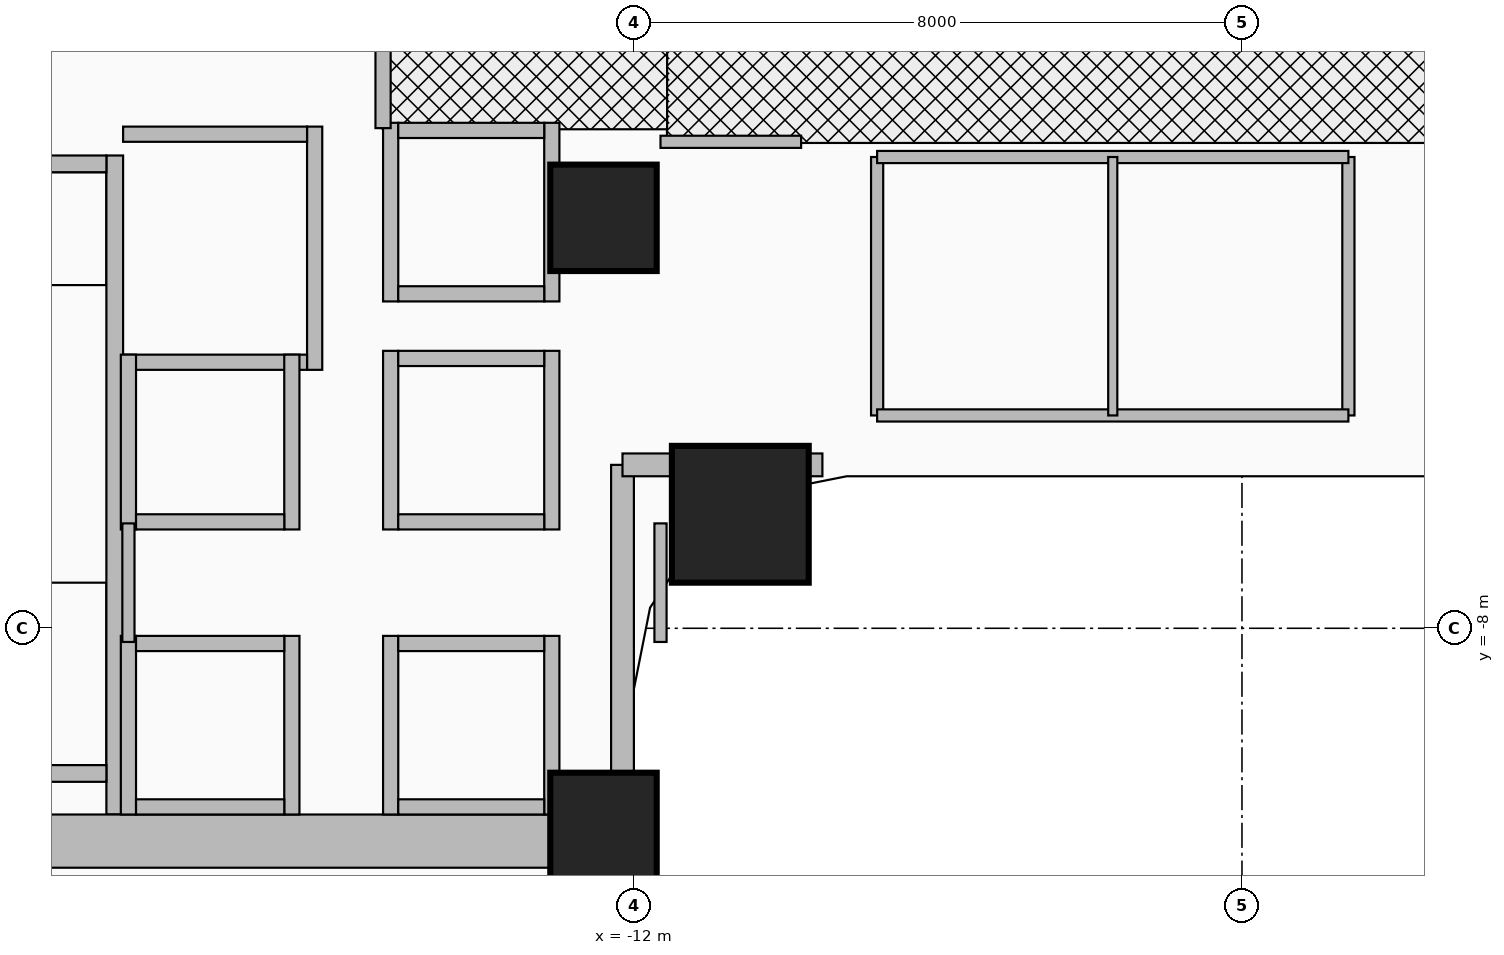
"""IFC4 building model, lengths in metres.
Left out: names, types, materials, properties, quantities, classifications, styles, units other than length and angle.
Written with IfcOpenShell. Run it as: python <this file> out.ifc"""

import sys

from ifc_helpers import new_model, si_unit, direction, frame, frame_2d, origin, origin_2d, place, context, subcontext, project, spatial, rectangle, extrude, source, transform, mapped, element, fill, save


model = new_model("IFC4")
c1 = context("Model", 3, precision=1e-05, world=origin(), true_north=direction((0.0, 1.0)))
c2 = subcontext(c1, "Body", "Model", "MODEL_VIEW")
j1 = project(units=[si_unit("LENGTHUNIT", "METRE"), si_unit("PLANEANGLEUNIT", "RADIAN")], contexts=[c1])
p1 = place(None, origin())
s1 = spatial("IfcSite", under=j1, at=p1, CompositionType="ELEMENT")
p2 = place(p1, origin())
s2 = spatial("IfcBuilding", under=s1, at=p2, CompositionType="ELEMENT")
p3 = place(p2, frame((0.0, 0.0, 5.2)))
s3 = spatial("IfcBuildingStorey", under=s2, at=p3, CompositionType="ELEMENT", Elevation=5.2)
p4 = place(p3, frame((-18.83, -10.45, 0.0), z_axis=(0.0, 0.0, 1.0), x_axis=(0.0, 1.0, 0.0)))
e1 = element("IfcWall", 1, at=p4, inside=s3, PredefinedType="SHEAR", context=c2, shape_type="SweptSolid", body=[
    extrude(rectangle(XDim=8.67, YDim=0.22, at=frame_2d((4.335, 0.0))), origin(), (0.0, 0.0, 1.0), 4.92),
])
p5 = place(p3, frame((-22.05, -9.91, 0.0), z_axis=(0.0, 0.0, 1.0), x_axis=(1.0, 0.0, 0.0)))
e2 = element("IfcWall", 2, at=p5, inside=s3, PredefinedType="SHEAR", context=c2, shape_type="SweptSolid", body=[
    extrude(rectangle(XDim=3.11, YDim=0.22, at=frame_2d((1.555, 0.0))), origin(), (0.0, 0.0, 1.0), 4.92),
])
p6 = place(p3, frame((-22.05, -1.89, 0.0), z_axis=(0.0, 0.0, 1.0), x_axis=(1.0, 0.0, 0.0)))
e3 = element("IfcWall", 3, at=p6, inside=s3, PredefinedType="SHEAR", context=c2, shape_type="SweptSolid", body=[
    extrude(rectangle(XDim=3.11, YDim=0.22, at=frame_2d((1.555, 0.0))), origin(), (0.0, 0.0, 1.0), 4.92),
])
p7 = place(p6, frame((1.0, 0.0, 0.0)))
e4 = element("IfcOpeningElement", 4, at=p7, cuts=e3, PredefinedType="OPENING", context=c2, shape_type="SweptSolid", body=[
    extrude(rectangle(XDim=1.1, YDim=2.15, at=frame_2d((0.55, 1.075))), frame((0.0, 0.125, 0.0), z_axis=(0.0, -1.0, 0.0), x_axis=(1.0, 0.0, 0.0)), (0.0, 0.0, 1.0), 0.25),
])
p8 = place(p3, frame((-22.65, -10.8, 0.0), z_axis=(0.0, 0.0, 1.0), x_axis=(1.0, 0.0, 0.0)))
e5 = element("IfcWall", 5, at=p8, inside=s3, PredefinedType="SHEAR", context=c2, shape_type="SweptSolid", body=[
    extrude(rectangle(XDim=10.25, YDim=0.7, at=frame_2d((5.125, 0.0))), origin(), (0.0, 0.0, 1.0), 4.92),
])
m1 = source(origin(), c2, "Body", "SweptSolid", [
    extrude(rectangle(XDim=1.4, YDim=1.4, at=origin_2d()), origin(), (0.0, 0.0, 1.0), 5.2),
])
for number, where, z_axis, x_axis in (
    (6, (-12.4, -10.6, 0.0), (0.0, 0.0, 1.0), (1.0, 0.0, 0.0)),
    (7, (-12.4, -2.6, 0.0), (0.0, 0.0, 1.0), (1.0, 0.0, 0.0)),
):
    element("IfcColumn", number, at=place(p3, frame(where, z_axis=z_axis, x_axis=x_axis)), inside=s3, PredefinedType="COLUMN", context=c2, shape_type="MappedRepresentation", body=[
        mapped(m1, transform((0.0, 0.0, 0.0), x_axis=(1.0, 0.0, 0.0), y_axis=(0.0, 1.0, 0.0), z_axis=(0.0, 0.0, 1.0), scale=1.0)),
    ])
m2 = source(origin(), c2, "Body", "SweptSolid", [
    extrude(rectangle(XDim=1.8, YDim=1.8, at=origin_2d()), origin(), (0.0, 0.0, 1.0), 5.2),
])
p9 = place(p3, frame((-10.6, -6.5, 0.0), z_axis=(0.0, 0.0, 1.0), x_axis=(1.0, 0.0, 0.0)))
e8 = element("IfcColumn", 8, at=p9, inside=s3, PredefinedType="COLUMN", context=c2, shape_type="MappedRepresentation", body=[
    mapped(m2, transform((0.0, 0.0, 0.0), x_axis=(1.0, 0.0, 0.0), y_axis=(0.0, 1.0, 0.0), z_axis=(0.0, 0.0, 1.0), scale=1.0)),
])
p10 = place(p3, frame((-12.15, -22.85, 0.0), z_axis=(0.0, 0.0, 1.0), x_axis=(0.0, 1.0, 0.0)))
e9 = element("IfcWall", 9, at=p10, inside=s3, PredefinedType="SOLIDWALL", context=c2, shape_type="SweptSolid", body=[
    extrude(rectangle(XDim=17.0, YDim=0.3, at=frame_2d((8.5, 0.0))), origin(), (0.0, 0.0, 1.0), 3.957),
])
p11 = place(p3, frame((-12.15, -5.85, 0.0), z_axis=(0.0, 0.0, 1.0), x_axis=(1.0, 0.0, 0.0)))
e10 = element("IfcWall", 10, at=p11, inside=s3, PredefinedType="SOLIDWALL", context=c2, shape_type="SweptSolid", body=[
    extrude(rectangle(XDim=2.63, YDim=0.3, at=frame_2d((1.315, 0.0))), origin(), (0.0, 0.0, 1.0), 4.92),
])
p12 = place(p3, frame((-16.2, -4.6, 0.0), z_axis=(0.0, 0.0, 1.0), x_axis=(0.0, 1.0, 0.0)))
e11 = element("IfcWall", 11, at=p12, inside=s3, PredefinedType="MOVABLE", context=c2, shape_type="SweptSolid", body=[
    extrude(rectangle(XDim=3.2, YDim=0.2, at=frame_2d((1.6, 0.0))), origin(), (0.0, 0.0, 1.0), 4.92),
])
p13 = place(p3, frame((-18.72, -4.5, 0.0), z_axis=(0.0, 0.0, 1.0), x_axis=(1.0, 0.0, 0.0)))
e12 = element("IfcWall", 12, at=p13, inside=s3, PredefinedType="MOVABLE", context=c2, shape_type="SweptSolid", body=[
    extrude(rectangle(XDim=2.42, YDim=0.2, at=frame_2d((1.21, 0.0))), origin(), (0.0, 0.0, 1.0), 4.92),
])
p14 = place(p3, frame((-18.72, -1.5, 0.0), z_axis=(0.0, 0.0, 1.0), x_axis=(1.0, 0.0, 0.0)))
e13 = element("IfcWall", 13, at=p14, inside=s3, PredefinedType="MOVABLE", context=c2, shape_type="SweptSolid", body=[
    extrude(rectangle(XDim=2.42, YDim=0.2, at=frame_2d((1.21, 0.0))), origin(), (0.0, 0.0, 1.0), 4.92),
])
p15 = place(p14, frame((0.61, 0.0, 0.0)))
e14 = element("IfcOpeningElement", 14, at=p15, cuts=e13, PredefinedType="OPENING", context=c2, shape_type="SweptSolid", body=[
    extrude(rectangle(XDim=1.2, YDim=2.1, at=frame_2d((0.6, 1.05))), frame((0.0, 0.115, 0.0), z_axis=(0.0, -1.0, 0.0), x_axis=(1.0, 0.0, 0.0)), (0.0, 0.0, 1.0), 0.23),
])
for number, where, z_axis, x_axis in (
    (15, (-15.2, -10.45, 0.0), (0.0, 0.0, 1.0), (0.0, 1.0, 0.0)),
    (16, (-13.08, -10.45, 0.0), (0.0, 0.0, 1.0), (0.0, 1.0, 0.0)),
):
    element("IfcWall", number, at=place(p3, frame(where, z_axis=z_axis, x_axis=x_axis)), inside=s3, PredefinedType="MOVABLE", context=c2, shape_type="SweptSolid", body=[
        extrude(rectangle(XDim=2.35, YDim=0.2, at=frame_2d((1.175, 0.0))), origin(), (0.0, 0.0, 1.0), 3.957),
    ])
p16 = place(p3, frame((-15.1, -10.35, 0.0), z_axis=(0.0, 0.0, 1.0), x_axis=(1.0, 0.0, 0.0)))
e17 = element("IfcWall", 17, at=p16, inside=s3, PredefinedType="MOVABLE", context=c2, shape_type="SweptSolid", body=[
    extrude(rectangle(XDim=1.92, YDim=0.2, at=frame_2d((0.96, 0.0))), origin(), (0.0, 0.0, 1.0), 3.957),
])
p17 = place(p3, frame((-15.1, -8.2, 0.0), z_axis=(0.0, 0.0, 1.0), x_axis=(1.0, 0.0, 0.0)))
e18 = element("IfcWall", 18, at=p17, inside=s3, PredefinedType="MOVABLE", context=c2, shape_type="SweptSolid", body=[
    extrude(rectangle(XDim=1.92, YDim=0.2, at=frame_2d((0.96, 0.0))), origin(), (0.0, 0.0, 1.0), 4.92),
])
p18 = place(p17, frame((0.41, 0.0, 0.0)))
e19 = element("IfcOpeningElement", 19, at=p18, cuts=e18, PredefinedType="OPENING", context=c2, shape_type="SweptSolid", body=[
    extrude(rectangle(XDim=1.1, YDim=2.1, at=frame_2d((0.55, 1.05))), frame((0.0, 0.115, 0.0), z_axis=(0.0, -1.0, 0.0), x_axis=(1.0, 0.0, 0.0)), (0.0, 0.0, 1.0), 0.23),
])
for number, where, z_axis, x_axis in (
    (20, (-15.2, -6.7, 0.0), (0.0, 0.0, 1.0), (0.0, 1.0, 0.0)),
    (21, (-13.08, -6.7, 0.0), (0.0, 0.0, 1.0), (0.0, 1.0, 0.0)),
):
    element("IfcWall", number, at=place(p3, frame(where, z_axis=z_axis, x_axis=x_axis)), inside=s3, PredefinedType="MOVABLE", context=c2, shape_type="SweptSolid", body=[
        extrude(rectangle(XDim=2.35, YDim=0.2, at=frame_2d((1.175, 0.0))), origin(), (0.0, 0.0, 1.0), 4.92),
    ])
p19 = place(p3, frame((-15.1, -6.6, 0.0), z_axis=(0.0, 0.0, 1.0), x_axis=(1.0, 0.0, 0.0)))
e22 = element("IfcWall", 22, at=p19, inside=s3, PredefinedType="MOVABLE", context=c2, shape_type="SweptSolid", body=[
    extrude(rectangle(XDim=1.92, YDim=0.2, at=frame_2d((0.96, 0.0))), origin(), (0.0, 0.0, 1.0), 4.92),
])
p20 = place(p19, frame((0.41, 0.0, 0.0)))
e23 = element("IfcOpeningElement", 23, at=p20, cuts=e22, PredefinedType="OPENING", context=c2, shape_type="SweptSolid", body=[
    extrude(rectangle(XDim=1.1, YDim=2.1, at=frame_2d((0.55, 1.05))), frame((0.0, 0.115, 0.0), z_axis=(0.0, -1.0, 0.0), x_axis=(1.0, 0.0, 0.0)), (0.0, 0.0, 1.0), 0.23),
])
p21 = place(p3, frame((-15.1, -4.45, 0.0), z_axis=(0.0, 0.0, 1.0), x_axis=(1.0, 0.0, 0.0)))
e24 = element("IfcWall", 24, at=p21, inside=s3, PredefinedType="MOVABLE", context=c2, shape_type="SweptSolid", body=[
    extrude(rectangle(XDim=1.92, YDim=0.2, at=frame_2d((0.96, 0.0))), origin(), (0.0, 0.0, 1.0), 4.92),
])
for number, where, z_axis, x_axis in (
    (25, (-18.65, -10.45, 0.0), (0.0, 0.0, 1.0), (0.0, 1.0, 0.0)),
    (26, (-16.5, -10.45, 0.0), (0.0, 0.0, 1.0), (0.0, 1.0, 0.0)),
):
    element("IfcWall", number, at=place(p3, frame(where, z_axis=z_axis, x_axis=x_axis)), inside=s3, PredefinedType="MOVABLE", context=c2, shape_type="SweptSolid", body=[
        extrude(rectangle(XDim=2.35, YDim=0.2, at=frame_2d((1.175, 0.0))), origin(), (0.0, 0.0, 1.0), 3.957),
    ])
p22 = place(p3, frame((-18.55, -10.35, 0.0), z_axis=(0.0, 0.0, 1.0), x_axis=(1.0, 0.0, 0.0)))
e27 = element("IfcWall", 27, at=p22, inside=s3, PredefinedType="MOVABLE", context=c2, shape_type="SweptSolid", body=[
    extrude(rectangle(XDim=1.95, YDim=0.2, at=frame_2d((0.975, 0.0))), origin(), (0.0, 0.0, 1.0), 3.957),
])
p23 = place(p3, frame((-18.55, -8.2, 0.0), z_axis=(0.0, 0.0, 1.0), x_axis=(1.0, 0.0, 0.0)))
e28 = element("IfcWall", 28, at=p23, inside=s3, PredefinedType="MOVABLE", context=c2, shape_type="SweptSolid", body=[
    extrude(rectangle(XDim=1.95, YDim=0.2, at=frame_2d((0.975, 0.0))), origin(), (0.0, 0.0, 1.0), 4.92),
])
for number, where, z_axis, x_axis in (
    (29, (-18.65, -6.7, 0.0), (0.0, 0.0, 1.0), (0.0, 1.0, 0.0)),
    (30, (-16.5, -6.7, 0.0), (0.0, 0.0, 1.0), (0.0, 1.0, 0.0)),
):
    element("IfcWall", number, at=place(p3, frame(where, z_axis=z_axis, x_axis=x_axis)), inside=s3, PredefinedType="MOVABLE", context=c2, shape_type="SweptSolid", body=[
        extrude(rectangle(XDim=2.3, YDim=0.2, at=frame_2d((1.15, 0.0))), origin(), (0.0, 0.0, 1.0), 4.92),
    ])
p24 = place(p3, frame((-18.55, -6.6, 0.0), z_axis=(0.0, 0.0, 1.0), x_axis=(1.0, 0.0, 0.0)))
e31 = element("IfcWall", 31, at=p24, inside=s3, PredefinedType="MOVABLE", context=c2, shape_type="SweptSolid", body=[
    extrude(rectangle(XDim=1.95, YDim=0.2, at=frame_2d((0.975, 0.0))), origin(), (0.0, 0.0, 1.0), 4.92),
])
for number, where, z_axis, x_axis in (
    (32, (-15.2, -3.7, 0.0), (0.0, 0.0, 1.0), (0.0, 1.0, 0.0)),
    (33, (-13.08, -3.7, 0.0), (0.0, 0.0, 1.0), (0.0, 1.0, 0.0)),
):
    element("IfcWall", number, at=place(p3, frame(where, z_axis=z_axis, x_axis=x_axis)), inside=s3, PredefinedType="MOVABLE", context=c2, shape_type="SweptSolid", body=[
        extrude(rectangle(XDim=2.35, YDim=0.2, at=frame_2d((1.175, 0.0))), origin(), (0.0, 0.0, 1.0), 4.92),
    ])
for number, where, z_axis, x_axis in (
    (34, (-15.1, -3.6, 0.0), (0.0, 0.0, 1.0), (1.0, 0.0, 0.0)),
    (35, (-15.1, -1.45, 0.0), (0.0, 0.0, 1.0), (1.0, 0.0, 0.0)),
):
    element("IfcWall", number, at=place(p3, frame(where, z_axis=z_axis, x_axis=x_axis)), inside=s3, PredefinedType="MOVABLE", context=c2, shape_type="SweptSolid", body=[
        extrude(rectangle(XDim=1.92, YDim=0.2, at=frame_2d((0.96, 0.0))), origin(), (0.0, 0.0, 1.0), 4.92),
    ])
p25 = place(p3, frame((-15.3, -1.42, 0.0), z_axis=(0.0, 0.0, 1.0), x_axis=(0.0, 1.0, 0.0)))
e36 = element("IfcWall", 36, at=p25, inside=s3, PredefinedType="PARTITIONING", context=c2, shape_type="SweptSolid", body=[
    extrude(rectangle(XDim=2.67, YDim=0.2, at=frame_2d((1.335, 0.0))), origin(), (0.0, 0.0, 1.0), 4.92),
])
p26 = place(p25, frame((0.78, 0.0, 0.0)))
e37 = element("IfcOpeningElement", 37, at=p26, cuts=e36, PredefinedType="OPENING", context=c2, shape_type="SweptSolid", body=[
    extrude(rectangle(XDim=1.05, YDim=2.15, at=frame_2d((0.525, 1.075))), frame((0.0, 0.115, 0.0), z_axis=(0.0, -1.0, 0.0), x_axis=(1.0, 0.0, 0.0)), (0.0, 0.0, 1.0), 0.23),
])
p27 = place(p3, frame((-18.65, -8.18, 0.0), z_axis=(0.0, 0.0, 1.0), x_axis=(0.0, 1.0, 0.0)))
e38 = element("IfcWall", 38, at=p27, inside=s3, PredefinedType="PARTITIONING", context=c2, shape_type="SweptSolid", body=[
    extrude(rectangle(XDim=1.56, YDim=0.16, at=frame_2d((0.78, 0.0))), origin(), (0.0, 0.0, 1.0), 4.92),
])
p28 = place(p3, frame((-11.65, -8.18, 0.0), z_axis=(0.0, 0.0, 1.0), x_axis=(0.0, 1.0, 0.0)))
e39 = element("IfcWall", 39, at=p28, inside=s3, PredefinedType="PARTITIONING", context=c2, shape_type="SweptSolid", body=[
    extrude(rectangle(XDim=1.56, YDim=0.16, at=frame_2d((0.78, 0.0))), origin(), (0.0, 0.0, 1.0), 3.957),
])
for number, where, z_axis, x_axis in (
    (40, (-8.8, -5.2, 0.0), (0.0, 0.0, 1.0), (0.0, 1.0, 0.0)),
    (41, (-2.6, -5.2, 0.0), (0.0, 0.0, 1.0), (0.0, 1.0, 0.0)),
):
    element("IfcWall", number, at=place(p3, frame(where, z_axis=z_axis, x_axis=x_axis)), inside=s3, PredefinedType="PARTITIONING", context=c2, shape_type="SweptSolid", body=[
        extrude(rectangle(XDim=3.4, YDim=0.16, at=frame_2d((1.7, 0.0))), origin(), (0.0, 0.0, 1.0), 4.92),
    ])
p29 = place(p3, frame((-8.8, -5.2, 0.0), z_axis=(0.0, 0.0, 1.0), x_axis=(1.0, 0.0, 0.0)))
e42 = element("IfcWall", 42, at=p29, inside=s3, PredefinedType="PARTITIONING", context=c2, shape_type="SweptSolid", body=[
    extrude(rectangle(XDim=6.2, YDim=0.16, at=frame_2d((3.1, 0.0))), origin(), (0.0, 0.0, 1.0), 4.92),
])
p30 = place(p3, frame((-8.8, -1.8, 0.0), z_axis=(0.0, 0.0, 1.0), x_axis=(1.0, 0.0, 0.0)))
e43 = element("IfcWall", 43, at=p30, inside=s3, PredefinedType="PARTITIONING", context=c2, shape_type="SweptSolid", body=[
    extrude(rectangle(XDim=6.2, YDim=0.16, at=frame_2d((3.1, 0.0))), origin(), (0.0, 0.0, 1.0), 4.92),
])
p31 = place(p30, frame((0.3, 0.0, 0.0)))
e44 = element("IfcOpeningElement", 44, at=p31, cuts=e43, PredefinedType="OPENING", context=c2, shape_type="SweptSolid", body=[
    extrude(rectangle(XDim=0.85, YDim=2.1, at=frame_2d((0.425, 1.05))), frame((0.0, 0.095, 0.0), z_axis=(0.0, -1.0, 0.0), x_axis=(1.0, 0.0, 0.0)), (0.0, 0.0, 1.0), 0.19),
])
p32 = place(p30, frame((3.35, 0.0, 0.0)))
e45 = element("IfcOpeningElement", 45, at=p32, cuts=e43, PredefinedType="OPENING", context=c2, shape_type="SweptSolid", body=[
    extrude(rectangle(XDim=0.85, YDim=2.1, at=frame_2d((0.425, 1.05))), frame((0.0, 0.095, 0.0), z_axis=(0.0, -1.0, 0.0), x_axis=(1.0, 0.0, 0.0)), (0.0, 0.0, 1.0), 0.19),
])
p33 = place(p3, frame((-5.7, -5.2, 0.0), z_axis=(0.0, 0.0, 1.0), x_axis=(0.0, 1.0, 0.0)))
e46 = element("IfcWall", 46, at=p33, inside=s3, PredefinedType="PARTITIONING", context=c2, shape_type="SweptSolid", body=[
    extrude(rectangle(XDim=3.4, YDim=0.12, at=frame_2d((1.7, 0.0))), origin(), (0.0, 0.0, 1.0), 4.92),
])
p34 = place(p3, frame((-11.65, -1.6, 0.0), z_axis=(0.0, 0.0, 1.0), x_axis=(1.0, 0.0, 0.0)))
e47 = element("IfcWall", 47, at=p34, inside=s3, PredefinedType="PARTITIONING", context=c2, shape_type="SweptSolid", body=[
    extrude(rectangle(XDim=1.85, YDim=0.16, at=frame_2d((0.925, 0.0))), origin(), (0.0, 0.0, 1.0), 4.92),
])
p35 = place(p15, origin())
e48 = element("IfcDoor", 48, at=p35, inside=s3, OperationType="DOUBLE_DOOR_SLIDING", PredefinedType="DOOR", context=c2, shape_type="SweptSolid", body=[
    extrude(rectangle(XDim=1.2, YDim=2.1, at=frame_2d((0.6, 1.05))), frame((0.0, 0.025, 0.0), z_axis=(0.0, -1.0, 0.0), x_axis=(1.0, 0.0, 0.0)), (0.0, 0.0, 1.0), 0.05),
])
fill(e14, e48)
p36 = place(p18, origin())
e49 = element("IfcDoor", 49, at=p36, inside=s3, OperationType="DOUBLE_DOOR_SLIDING", PredefinedType="DOOR", context=c2, shape_type="SweptSolid", body=[
    extrude(rectangle(XDim=1.1, YDim=2.1, at=frame_2d((0.55, 1.05))), frame((0.0, 0.025, 0.0), z_axis=(0.0, -1.0, 0.0), x_axis=(1.0, 0.0, 0.0)), (0.0, 0.0, 1.0), 0.05),
])
fill(e19, e49)
p37 = place(p20, origin())
e50 = element("IfcDoor", 50, at=p37, inside=s3, OperationType="DOUBLE_DOOR_SLIDING", PredefinedType="DOOR", context=c2, shape_type="SweptSolid", body=[
    extrude(rectangle(XDim=1.1, YDim=2.1, at=frame_2d((0.55, 1.05))), frame((0.0, 0.025, 0.0), z_axis=(0.0, -1.0, 0.0), x_axis=(1.0, 0.0, 0.0)), (0.0, 0.0, 1.0), 0.05),
])
fill(e23, e50)
p38 = place(p26, origin())
e51 = element("IfcDoor", 51, at=p38, inside=s3, OperationType="SINGLE_SWING_RIGHT", PredefinedType="DOOR", context=c2, shape_type="SweptSolid", body=[
    extrude(rectangle(XDim=1.05, YDim=2.15, at=frame_2d((0.525, 1.075))), frame((0.0, 0.025, 0.0), z_axis=(0.0, -1.0, 0.0), x_axis=(1.0, 0.0, 0.0)), (0.0, 0.0, 1.0), 0.05),
])
fill(e37, e51)
p39 = place(p31, origin())
e52 = element("IfcDoor", 52, at=p39, inside=s3, OperationType="SINGLE_SWING_RIGHT", PredefinedType="DOOR", context=c2, shape_type="SweptSolid", body=[
    extrude(rectangle(XDim=0.85, YDim=2.1, at=frame_2d((0.425, 1.05))), frame((0.0, 0.025, 0.0), z_axis=(0.0, -1.0, 0.0), x_axis=(1.0, 0.0, 0.0)), (0.0, 0.0, 1.0), 0.05),
])
fill(e44, e52)
p40 = place(p32, origin())
e53 = element("IfcDoor", 53, at=p40, inside=s3, OperationType="SINGLE_SWING_LEFT", PredefinedType="DOOR", context=c2, shape_type="SweptSolid", body=[
    extrude(rectangle(XDim=0.85, YDim=2.1, at=frame_2d((0.425, 1.05))), frame((0.0, 0.025, 0.0), z_axis=(0.0, -1.0, 0.0), x_axis=(1.0, 0.0, 0.0)), (0.0, 0.0, 1.0), 0.05),
])
fill(e45, e53)
save(model, sys.argv[1])
